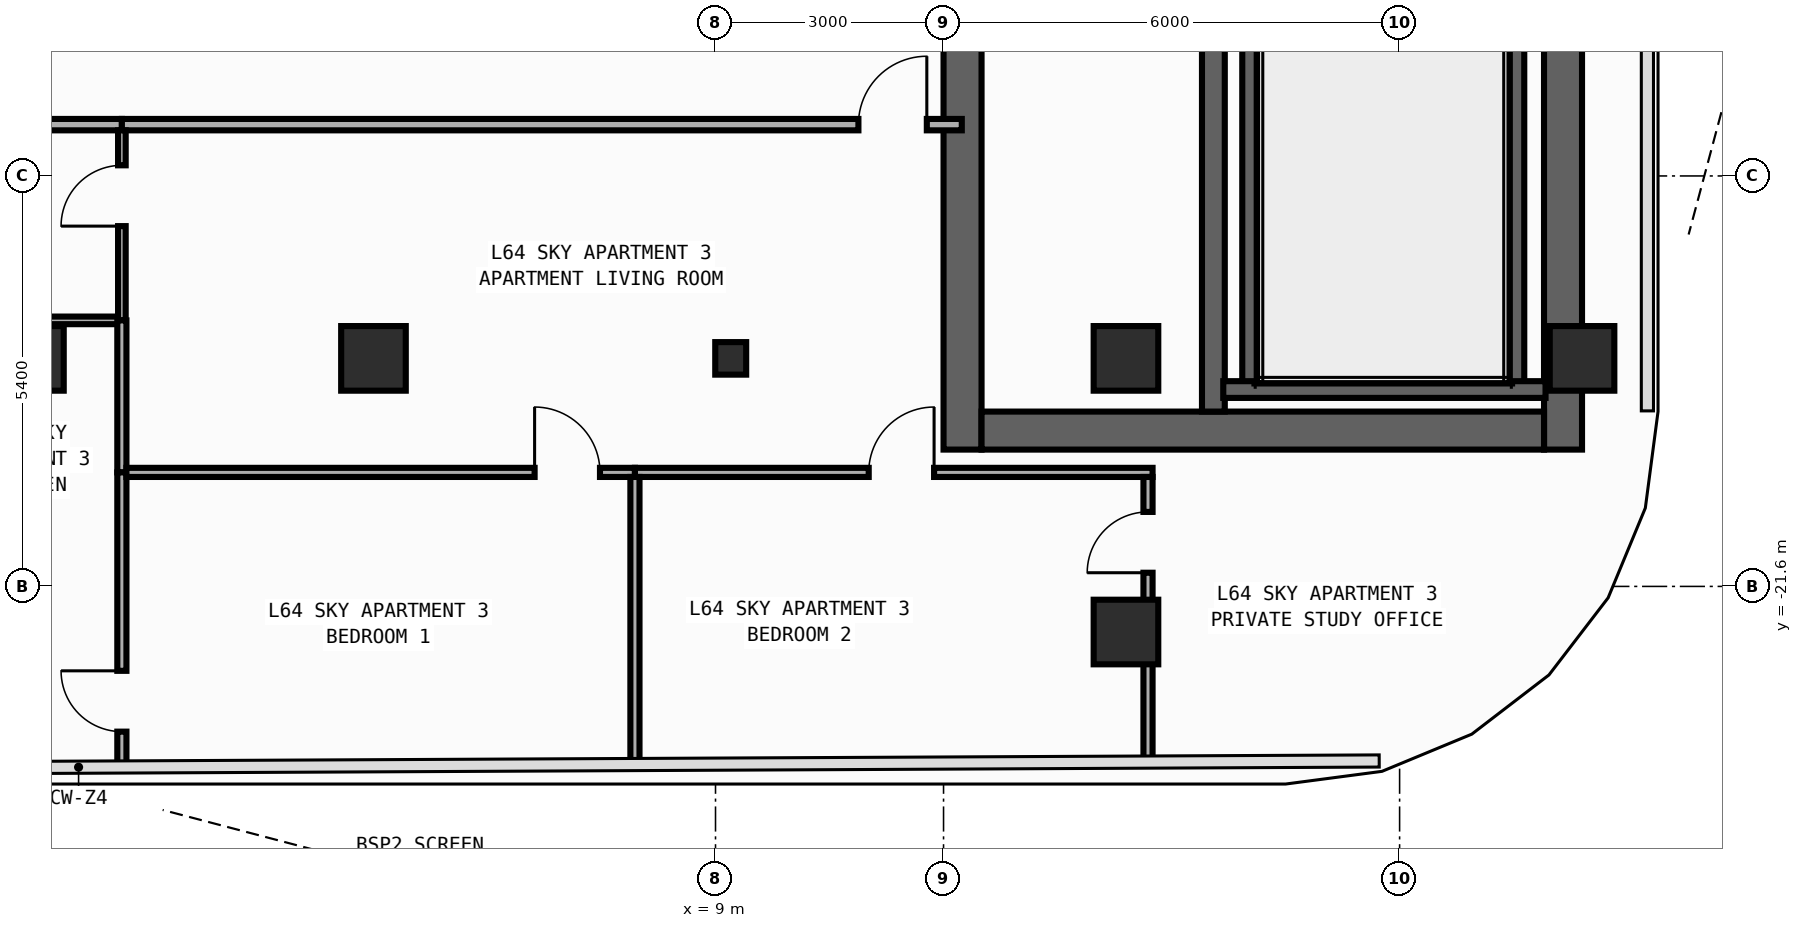
"""IFC4 building model, lengths in metres.
Left out: names, types, materials, properties, quantities, classifications, styles, units other than length and angle.
Written with IfcOpenShell. Run it as: python <this file> out.ifc"""

import sys

from ifc_helpers import new_model, si_unit, direction, frame, frame_2d, origin, origin_2d, place, context, subcontext, project, spatial, rectangle, i_section, extrude, element, fill, save


model = new_model("IFC4")
c1 = context("Model", 3, precision=1e-05, world=origin(), true_north=direction((0.0, 1.0)))
c2 = subcontext(c1, "Body", "Model", "MODEL_VIEW")
j1 = project(units=[si_unit("LENGTHUNIT", "METRE"), si_unit("PLANEANGLEUNIT", "RADIAN")], contexts=[c1])
p1 = place(None, origin())
s1 = spatial("IfcSite", under=j1, at=p1, CompositionType="ELEMENT")
p2 = place(p1, origin())
s2 = spatial("IfcBuilding", under=s1, at=p2, CompositionType="ELEMENT")
p3 = place(p2, frame((0.0, 0.0, 269.2)))
s3 = spatial("IfcBuildingStorey", under=s2, at=p3, CompositionType="ELEMENT", Elevation=269.2)
p4 = place(p3, frame((12.25, -19.8, 0.0), z_axis=(0.0, 0.0, 1.0), x_axis=(0.0, 1.0, 0.0)))
e1 = element("IfcWall", 1, at=p4, inside=s3, PredefinedType="SHEAR", context=c2, shape_type="SweptSolid", body=[
    extrude(rectangle(XDim=27.0, YDim=0.5, at=frame_2d((13.5, 0.0))), origin(), (0.0, 0.0, 1.0), 3.25),
])
p5 = place(p4, frame((23.05, 0.0, 0.0)))
e2 = element("IfcOpeningElement", 2, at=p5, cuts=e1, PredefinedType="OPENING", context=c2, shape_type="SweptSolid", body=[
    extrude(rectangle(XDim=1.1, YDim=2.2, at=frame_2d((0.55, 1.1))), frame((0.0, 0.26, 0.0), z_axis=(0.0, -1.0, 0.0), x_axis=(1.0, 0.0, 0.0)), (0.0, 0.0, 1.0), 0.52),
])
p6 = place(p4, frame((19.85, 0.0, 0.0)))
e3 = element("IfcOpeningElement", 3, at=p6, cuts=e1, PredefinedType="OPENING", context=c2, shape_type="SweptSolid", body=[
    extrude(rectangle(XDim=1.1, YDim=2.2, at=frame_2d((0.55, 1.1))), frame((0.0, 0.26, 0.0), z_axis=(0.0, -1.0, 0.0), x_axis=(1.0, 0.0, 0.0)), (0.0, 0.0, 1.0), 0.52),
])
p7 = place(p4, frame((16.65, 0.0, 0.0)))
e4 = element("IfcOpeningElement", 4, at=p7, cuts=e1, PredefinedType="OPENING", context=c2, shape_type="SweptSolid", body=[
    extrude(rectangle(XDim=1.1, YDim=2.2, at=frame_2d((0.55, 1.1))), frame((0.0, 0.26, 0.0), z_axis=(0.0, -1.0, 0.0), x_axis=(1.0, 0.0, 0.0)), (0.0, 0.0, 1.0), 0.52),
])
p8 = place(p4, frame((7.175, 0.0, 0.0)))
e5 = element("IfcOpeningElement", 5, at=p8, cuts=e1, PredefinedType="OPENING", context=c2, shape_type="SweptSolid", body=[
    extrude(rectangle(XDim=0.85, YDim=2.1, at=frame_2d((0.425, 1.05))), frame((0.0, 0.26, 0.0), z_axis=(0.0, -1.0, 0.0), x_axis=(1.0, 0.0, 0.0)), (0.0, 0.0, 1.0), 0.52),
])
p9 = place(p4, frame((10.375, 0.0, 0.0)))
e6 = element("IfcOpeningElement", 6, at=p9, cuts=e1, PredefinedType="OPENING", context=c2, shape_type="SweptSolid", body=[
    extrude(rectangle(XDim=0.85, YDim=2.1, at=frame_2d((0.425, 1.05))), frame((0.0, 0.26, 0.0), z_axis=(0.0, -1.0, 0.0), x_axis=(1.0, 0.0, 0.0)), (0.0, 0.0, 1.0), 0.52),
])
p10 = place(p4, frame((12.725, 0.0, 0.0)))
e7 = element("IfcOpeningElement", 7, at=p10, cuts=e1, PredefinedType="OPENING", context=c2, shape_type="SweptSolid", body=[
    extrude(rectangle(XDim=1.15, YDim=2.2, at=frame_2d((0.575, 1.1))), frame((0.0, 0.26, 0.0), z_axis=(0.0, -1.0, 0.0), x_axis=(1.0, 0.0, 0.0)), (0.0, 0.0, 1.0), 0.52),
])
p11 = place(p4, frame((25.125, 0.0, 0.0)))
e8 = element("IfcOpeningElement", 8, at=p11, cuts=e1, PredefinedType="OPENING", context=c2, shape_type="SweptSolid", body=[
    extrude(rectangle(XDim=0.85, YDim=2.1, at=frame_2d((0.425, 1.05))), frame((0.0, 0.26, 0.0), z_axis=(0.0, -1.0, 0.0), x_axis=(1.0, 0.0, 0.0)), (0.0, 0.0, 1.0), 0.52),
])
p12 = place(p3, frame((20.15, -19.8, 0.0), z_axis=(0.0, 0.0, 1.0), x_axis=(0.0, 1.0, 0.0)))
e9 = element("IfcWall", 9, at=p12, inside=s3, PredefinedType="SHEAR", context=c2, shape_type="SweptSolid", body=[
    extrude(rectangle(XDim=27.0, YDim=0.5, at=frame_2d((13.5, 0.0))), origin(), (0.0, 0.0, 1.0), 3.25),
])
p13 = place(p3, frame((12.5, -19.55, 0.0), z_axis=(0.0, 0.0, 1.0), x_axis=(1.0, 0.0, 0.0)))
e10 = element("IfcWall", 10, at=p13, inside=s3, PredefinedType="SHEAR", context=c2, shape_type="SweptSolid", body=[
    extrude(rectangle(XDim=7.4, YDim=0.5, at=frame_2d((3.7, 0.0))), origin(), (0.0, 0.0, 1.0), 3.25),
])
p14 = place(p3, frame((15.55, -19.3, 0.0), z_axis=(0.0, 0.0, 1.0), x_axis=(0.0, 1.0, 0.0)))
e11 = element("IfcWall", 11, at=p14, inside=s3, PredefinedType="SHEAR", context=c2, shape_type="SweptSolid", body=[
    extrude(rectangle(XDim=26.0, YDim=0.3, at=frame_2d((13.0, 0.0))), origin(), (0.0, 0.0, 1.0), 3.25),
])
p15 = place(p14, frame((12.225, 0.0, 0.0)))
e12 = element("IfcOpeningElement", 12, at=p15, cuts=e11, PredefinedType="OPENING", context=c2, shape_type="SweptSolid", body=[
    extrude(rectangle(XDim=1.15, YDim=2.2, at=frame_2d((0.575, 1.1))), frame((0.0, 0.16, 0.0), z_axis=(0.0, -1.0, 0.0), x_axis=(1.0, 0.0, 0.0)), (0.0, 0.0, 1.0), 0.32),
])
p16 = place(p14, frame((24.625, 0.0, 0.0)))
e13 = element("IfcOpeningElement", 13, at=p16, cuts=e11, PredefinedType="OPENING", context=c2, shape_type="SweptSolid", body=[
    extrude(rectangle(XDim=0.85, YDim=2.1, at=frame_2d((0.425, 1.05))), frame((0.0, 0.16, 0.0), z_axis=(0.0, -1.0, 0.0), x_axis=(1.0, 0.0, 0.0)), (0.0, 0.0, 1.0), 0.32),
])
for number, where, z_axis, x_axis in (
    (14, (16.04, -19.01, 0.0), (0.0, 0.0, 1.0), (0.0, 1.0, 0.0)),
    (15, (19.53, -19.01, 0.0), (0.0, 0.0, 1.0), (0.0, 1.0, 0.0)),
):
    element("IfcWall", number, at=place(p3, frame(where, z_axis=z_axis, x_axis=x_axis)), inside=s3, PredefinedType="SHEAR", context=c2, shape_type="SweptSolid", body=[
        extrude(rectangle(XDim=11.42, YDim=0.22, at=frame_2d((5.71, 0.0))), origin(), (0.0, 0.0, 1.0), 3.25),
    ])
p17 = place(p3, frame((15.68, -19.01, 0.0), z_axis=(0.0, 0.0, 1.0), x_axis=(1.0, 0.0, 0.0)))
e16 = element("IfcWall", 16, at=p17, inside=s3, PredefinedType="SHEAR", context=c2, shape_type="SweptSolid", body=[
    extrude(rectangle(XDim=4.24, YDim=0.22, at=frame_2d((2.12, 0.0))), origin(), (0.0, 0.0, 1.0), 3.25),
])
p18 = place(p3, frame((9.2, -18.6, 0.0), z_axis=(0.0, 0.0, 1.0), x_axis=(1.0, 0.0, 0.0)))
e17 = element("IfcColumn", 17, at=p18, inside=s3, PredefinedType="COLUMN", context=c2, shape_type="SweptSolid", body=[
    extrude(i_section(OverallWidth=0.407, OverallDepth=0.428, WebThickness=0.02, FlangeThickness=0.035, FilletRadius=0.022, at=origin_2d()), origin(), (0.0, 0.0, 1.0), 3.6),
])
for number, where, z_axis, x_axis in (
    (18, (20.4, -18.6, 0.0), (0.0, 0.0, 1.0), (1.0, 0.0, 0.0)),
    (19, (14.4, -18.6, 0.0), (0.0, 0.0, 1.0), (1.0, 0.0, 0.0)),
    (20, (0.0, -18.6, 0.0), (0.0, 0.0, 1.0), (1.0, 0.0, 0.0)),
    (21, (4.5, -18.6, 0.0), (0.0, 0.0, 1.0), (1.0, 0.0, 0.0)),
    (22, (14.4, -22.2, 0.0), (0.0, 0.0, 1.0), (1.0, 0.0, 0.0)),
):
    element("IfcColumn", number, at=place(p3, frame(where, z_axis=z_axis, x_axis=x_axis)), inside=s3, PredefinedType="COLUMN", context=c2, shape_type="SweptSolid", body=[
        extrude(rectangle(XDim=0.85, YDim=0.85, at=origin_2d()), origin(), (0.0, 0.0, 1.0), 3.6),
    ])
p19 = place(p3, frame((-1.4, -15.525, 0.0), z_axis=(0.0, 0.0, 1.0), x_axis=(1.0, 0.0, 0.0)))
e23 = element("IfcWall", 23, at=p19, inside=s3, PredefinedType="PARTITIONING", context=c2, shape_type="SweptSolid", body=[
    extrude(rectangle(XDim=2.59, YDim=0.15, at=frame_2d((1.295, 0.0))), origin(), (0.0, 0.0, 1.0), 3.25),
])
p20 = place(p3, frame((1.19, -15.525, 0.0), z_axis=(0.0, 0.0, 1.0), x_axis=(1.0, 0.0, 0.0)))
e24 = element("IfcWall", 24, at=p20, inside=s3, PredefinedType="PARTITIONING", context=c2, shape_type="SweptSolid", body=[
    extrude(rectangle(XDim=11.05, YDim=0.15, at=frame_2d((5.525, 0.0))), origin(), (0.0, 0.0, 1.0), 3.25),
])
p21 = place(p20, frame((9.69, 0.0, 0.0)))
e25 = element("IfcOpeningElement", 25, at=p21, cuts=e24, PredefinedType="OPENING", context=c2, shape_type="SweptSolid", body=[
    extrude(rectangle(XDim=0.9, YDim=2.15, at=frame_2d((0.45, 1.075))), frame((0.0, 0.085, 0.0), z_axis=(0.0, -1.0, 0.0), x_axis=(1.0, 0.0, 0.0)), (0.0, 0.0, 1.0), 0.17),
])
p22 = place(p3, frame((-1.33, -18.1, 0.0), z_axis=(0.0, 0.0, 1.0), x_axis=(1.0, 0.0, 0.0)))
e26 = element("IfcWall", 26, at=p22, inside=s3, PredefinedType="PARTITIONING", context=c2, shape_type="SweptSolid", body=[
    extrude(rectangle(XDim=2.47, YDim=0.1, at=frame_2d((1.235, 0.0))), origin(), (0.0, 0.0, 1.0), 3.25),
])
p23 = place(p3, frame((1.19, -18.1, 0.0), z_axis=(0.0, 0.0, 1.0), x_axis=(0.0, 1.0, 0.0)))
e27 = element("IfcWall", 27, at=p23, inside=s3, PredefinedType="PARTITIONING", context=c2, shape_type="SweptSolid", body=[
    extrude(rectangle(XDim=2.5, YDim=0.1, at=frame_2d((1.25, 0.0))), origin(), (0.0, 0.0, 1.0), 3.25),
])
p24 = place(p23, frame((1.24, 0.0, 0.0)))
e28 = element("IfcOpeningElement", 28, at=p24, cuts=e27, PredefinedType="OPENING", context=c2, shape_type="SweptSolid", body=[
    extrude(rectangle(XDim=0.8, YDim=2.1, at=frame_2d((0.4, 1.05))), frame((0.0, 0.06, 0.0), z_axis=(0.0, -1.0, 0.0), x_axis=(1.0, 0.0, 0.0)), (0.0, 0.0, 1.0), 0.12),
])
p25 = place(p3, frame((1.19, -20.1, 0.0), z_axis=(0.0, 0.0, 1.0), x_axis=(0.0, 1.0, 0.0)))
e29 = element("IfcWall", 29, at=p25, inside=s3, PredefinedType="PARTITIONING", context=c2, shape_type="SweptSolid", body=[
    extrude(rectangle(XDim=2.0, YDim=0.12, at=frame_2d((1.0, 0.0))), origin(), (0.0, 0.0, 1.0), 3.25),
])
p26 = place(p3, frame((1.19, -23.971, 0.0), z_axis=(0.0, 0.0, 1.0), x_axis=(0.0, 1.0, 0.0)))
e30 = element("IfcWall", 30, at=p26, inside=s3, PredefinedType="PARTITIONING", context=c2, shape_type="SweptSolid", body=[
    extrude(rectangle(XDim=3.871, YDim=0.12, at=frame_2d((1.935, 0.0))), origin(), (0.0, 0.0, 1.0), 3.25),
])
p27 = place(p26, frame((0.46, 0.0, 0.0)))
e31 = element("IfcOpeningElement", 31, at=p27, cuts=e30, PredefinedType="OPENING", context=c2, shape_type="SweptSolid", body=[
    extrude(rectangle(XDim=0.8, YDim=2.1, at=frame_2d((0.4, 1.05))), frame((0.0, 0.07, 0.0), z_axis=(0.0, -1.0, 0.0), x_axis=(1.0, 0.0, 0.0)), (0.0, 0.0, 1.0), 0.14),
])
p28 = place(p3, frame((1.25, -20.1, 0.0), z_axis=(0.0, 0.0, 1.0), x_axis=(1.0, 0.0, 0.0)))
e32 = element("IfcWall", 32, at=p28, inside=s3, PredefinedType="PARTITIONING", context=c2, shape_type="SweptSolid", body=[
    extrude(rectangle(XDim=6.69, YDim=0.12, at=frame_2d((3.345, 0.0))), origin(), (0.0, 0.0, 1.0), 3.25),
])
p29 = place(p28, frame((5.37, 0.0, 0.0)))
e33 = element("IfcOpeningElement", 33, at=p29, cuts=e32, PredefinedType="OPENING", context=c2, shape_type="SweptSolid", body=[
    extrude(rectangle(XDim=0.86, YDim=2.15, at=frame_2d((0.43, 1.075))), frame((0.0, 0.07, 0.0), z_axis=(0.0, -1.0, 0.0), x_axis=(1.0, 0.0, 0.0)), (0.0, 0.0, 1.0), 0.14),
])
p30 = place(p3, frame((7.94, -20.1, 0.0), z_axis=(0.0, 0.0, 1.0), x_axis=(1.0, 0.0, 0.0)))
e34 = element("IfcWall", 34, at=p30, inside=s3, PredefinedType="PARTITIONING", context=c2, shape_type="SweptSolid", body=[
    extrude(rectangle(XDim=6.81, YDim=0.12, at=frame_2d((3.405, 0.0))), origin(), (0.0, 0.0, 1.0), 3.25),
])
p31 = place(p30, frame((3.076, 0.0, 0.0)))
e35 = element("IfcOpeningElement", 35, at=p31, cuts=e34, PredefinedType="OPENING", context=c2, shape_type="SweptSolid", body=[
    extrude(rectangle(XDim=0.86, YDim=2.15, at=frame_2d((0.43, 1.075))), frame((0.0, 0.07, 0.0), z_axis=(0.0, -1.0, 0.0), x_axis=(1.0, 0.0, 0.0)), (0.0, 0.0, 1.0), 0.14),
])
p32 = place(p3, frame((14.69, -23.906, 0.0), z_axis=(0.0, 0.0, 1.0), x_axis=(0.0, 1.0, 0.0)))
e36 = element("IfcWall", 36, at=p32, inside=s3, PredefinedType="PARTITIONING", context=c2, shape_type="SweptSolid", body=[
    extrude(rectangle(XDim=3.746, YDim=0.12, at=frame_2d((1.873, 0.0))), origin(), (0.0, 0.0, 1.0), 2.35),
])
p33 = place(p32, frame((2.486, 0.0, 0.0)))
e37 = element("IfcOpeningElement", 37, at=p33, cuts=e36, PredefinedType="OPENING", context=c2, shape_type="SweptSolid", body=[
    extrude(rectangle(XDim=0.8, YDim=2.1, at=frame_2d((0.4, 1.05))), frame((0.0, 0.07, 0.0), z_axis=(0.0, -1.0, 0.0), x_axis=(1.0, 0.0, 0.0)), (0.0, 0.0, 1.0), 0.14),
])
p34 = place(p3, frame((7.94, -23.938, 0.0), z_axis=(0.0, 0.0, 1.0), x_axis=(0.0, 1.0, 0.0)))
e38 = element("IfcWall", 38, at=p34, inside=s3, PredefinedType="PARTITIONING", context=c2, shape_type="SweptSolid", body=[
    extrude(rectangle(XDim=3.779, YDim=0.12, at=frame_2d((1.889, 0.0))), origin(), (0.0, 0.0, 1.0), 3.25),
])
p35 = place(p21, origin())
e39 = element("IfcDoor", 39, at=p35, inside=s3, OperationType="SINGLE_SWING_RIGHT", PredefinedType="DOOR", context=c2, shape_type="SweptSolid", body=[
    extrude(rectangle(XDim=0.9, YDim=2.15, at=frame_2d((0.45, 1.075))), frame((0.0, 0.025, 0.0), z_axis=(0.0, -1.0, 0.0), x_axis=(1.0, 0.0, 0.0)), (0.0, 0.0, 1.0), 0.05),
])
fill(e25, e39)
p36 = place(p24, origin())
e40 = element("IfcDoor", 40, at=p36, inside=s3, OperationType="SINGLE_SWING_LEFT", PredefinedType="DOOR", context=c2, shape_type="SweptSolid", body=[
    extrude(rectangle(XDim=0.8, YDim=2.1, at=frame_2d((0.4, 1.05))), frame((0.0, 0.025, 0.0), z_axis=(0.0, -1.0, 0.0), x_axis=(1.0, 0.0, 0.0)), (0.0, 0.0, 1.0), 0.05),
])
fill(e28, e40)
p37 = place(p29, origin())
e41 = element("IfcDoor", 41, at=p37, inside=s3, OperationType="SINGLE_SWING_LEFT", PredefinedType="DOOR", context=c2, shape_type="SweptSolid", body=[
    extrude(rectangle(XDim=0.86, YDim=2.15, at=frame_2d((0.43, 1.075))), frame((0.0, 0.025, 0.0), z_axis=(0.0, -1.0, 0.0), x_axis=(1.0, 0.0, 0.0)), (0.0, 0.0, 1.0), 0.05),
])
fill(e33, e41)
p38 = place(p31, origin())
e42 = element("IfcDoor", 42, at=p38, inside=s3, OperationType="SINGLE_SWING_RIGHT", PredefinedType="DOOR", context=c2, shape_type="SweptSolid", body=[
    extrude(rectangle(XDim=0.86, YDim=2.15, at=frame_2d((0.43, 1.075))), frame((0.0, 0.025, 0.0), z_axis=(0.0, -1.0, 0.0), x_axis=(1.0, 0.0, 0.0)), (0.0, 0.0, 1.0), 0.05),
])
fill(e35, e42)
p39 = place(p27, origin())
e43 = element("IfcDoor", 43, at=p39, inside=s3, OperationType="SINGLE_SWING_RIGHT", PredefinedType="DOOR", context=c2, shape_type="SweptSolid", body=[
    extrude(rectangle(XDim=0.8, YDim=2.1, at=frame_2d((0.4, 1.05))), frame((0.0, 0.025, 0.0), z_axis=(0.0, -1.0, 0.0), x_axis=(1.0, 0.0, 0.0)), (0.0, 0.0, 1.0), 0.05),
])
fill(e31, e43)
p40 = place(p33, origin())
e44 = element("IfcDoor", 44, at=p40, inside=s3, OperationType="SINGLE_SWING_LEFT", PredefinedType="DOOR", context=c2, shape_type="SweptSolid", body=[
    extrude(rectangle(XDim=0.8, YDim=2.1, at=frame_2d((0.4, 1.05))), frame((0.0, 0.025, 0.0), z_axis=(0.0, -1.0, 0.0), x_axis=(1.0, 0.0, 0.0)), (0.0, 0.0, 1.0), 0.05),
])
fill(e37, e44)
save(model, sys.argv[1])
